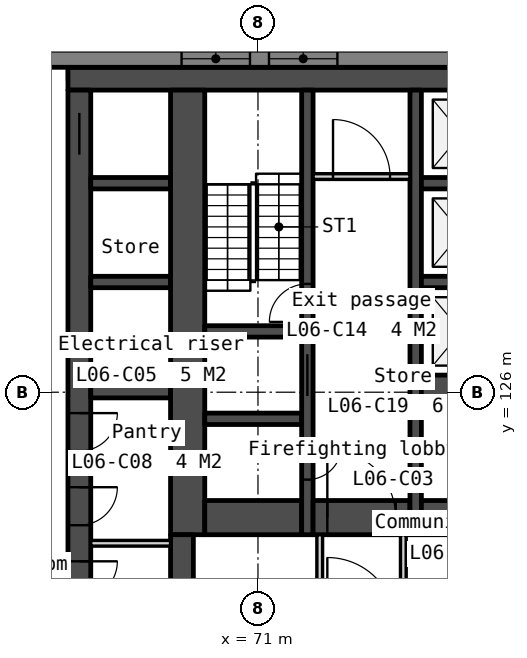
"""IFC4 building model, lengths in metres.
Left out: names, types, materials, properties, quantities, classifications, styles, units other than length and angle.
Written with IfcOpenShell. Run it as: python <this file> out.ifc"""

import sys

from ifc_helpers import new_model, si_unit, direction, frame, frame_2d, origin, place, context, subcontext, project, spatial, polyline, rectangle, outline, extrude, element, fill, save


model = new_model("IFC4")
c1 = context("Model", 3, precision=1e-05, world=origin(), true_north=direction((0.0, 1.0)))
c2 = subcontext(c1, "Body", "Model", "MODEL_VIEW")
j1 = project(units=[si_unit("LENGTHUNIT", "METRE"), si_unit("PLANEANGLEUNIT", "RADIAN")], contexts=[c1])
p1 = place(None, origin())
s1 = spatial("IfcSite", under=j1, at=p1, CompositionType="ELEMENT")
p2 = place(p1, origin())
s2 = spatial("IfcBuilding", under=s1, at=p2, CompositionType="ELEMENT")
p3 = place(p2, frame((0.0, 0.0, 35.0)))
s3 = spatial("IfcBuildingStorey", under=s2, at=p3, CompositionType="ELEMENT", Elevation=35.0)
p4 = place(p3, frame((66.0, 134.25, 0.0), z_axis=(0.0, 0.0, 1.0), x_axis=(1.0, 0.0, 0.0)))
e1 = element("IfcWall", 1, at=p4, inside=s3, PredefinedType="SOLIDWALL", context=c2, shape_type="SweptSolid", body=[
    extrude(rectangle(XDim=28.0, YDim=0.6, at=frame_2d((14.0, 0.0))), origin(), (0.0, 0.0, 1.0), 3.35),
])
p5 = place(p3, frame((66.3, 133.95, 0.0), z_axis=(0.0, 0.0, 1.0), x_axis=(0.0, -1.0, 0.0)))
e2 = element("IfcWall", 2, at=p5, inside=s3, PredefinedType="SOLIDWALL", context=c2, shape_type="SweptSolid", body=[
    extrude(rectangle(XDim=13.8, YDim=0.6, at=frame_2d((6.9, 0.0))), origin(), (0.0, 0.0, 1.0), 3.35),
])
p6 = place(p5, frame((0.6, 0.0, 0.0)))
e3 = element("IfcOpeningElement", 3, at=p6, cuts=e2, PredefinedType="OPENING", context=c2, shape_type="SweptSolid", body=[
    extrude(rectangle(XDim=1.1, YDim=2.1, at=frame_2d((0.55, 1.05))), frame((0.0, 0.31, 0.0), z_axis=(0.0, -1.0, 0.0), x_axis=(1.0, 0.0, 0.0)), (0.0, 0.0, 1.0), 0.62),
])
p7 = place(p5, frame((12.4, 0.0, 0.0)))
e4 = element("IfcOpeningElement", 4, at=p7, cuts=e2, PredefinedType="OPENING", context=c2, shape_type="SweptSolid", body=[
    extrude(rectangle(XDim=1.0, YDim=2.1, at=frame_2d((0.5, 1.05))), frame((0.0, 0.31, 0.0), z_axis=(0.0, -1.0, 0.0), x_axis=(1.0, 0.0, 0.0)), (0.0, 0.0, 1.0), 0.62),
])
p8 = place(p5, frame((8.5, 0.0, 0.0)))
e5 = element("IfcOpeningElement", 5, at=p8, cuts=e2, PredefinedType="OPENING", context=c2, shape_type="SweptSolid", body=[
    extrude(rectangle(XDim=1.0, YDim=2.1, at=frame_2d((0.5, 1.05))), frame((0.0, 0.31, 0.0), z_axis=(0.0, -1.0, 0.0), x_axis=(1.0, 0.0, 0.0)), (0.0, 0.0, 1.0), 0.62),
])
p9 = place(p5, frame((10.45, 0.0, 0.0)))
e6 = element("IfcOpeningElement", 6, at=p9, cuts=e2, PredefinedType="OPENING", context=c2, shape_type="SweptSolid", body=[
    extrude(rectangle(XDim=1.0, YDim=2.1, at=frame_2d((0.5, 1.05))), frame((0.0, 0.31, 0.0), z_axis=(0.0, -1.0, 0.0), x_axis=(1.0, 0.0, 0.0)), (0.0, 0.0, 1.0), 0.62),
])
for number, where, z_axis, x_axis in (
    (7, (66.6, 131.5, 0.0), (0.0, 0.0, 1.0), (1.0, 0.0, 0.0)),
    (8, (66.6, 128.9, 0.0), (0.0, 0.0, 1.0), (1.0, 0.0, 0.0)),
):
    element("IfcWall", number, at=place(p3, frame(where, z_axis=z_axis, x_axis=x_axis)), inside=s3, PredefinedType="SOLIDWALL", context=c2, shape_type="SweptSolid", body=[
        extrude(rectangle(XDim=2.1, YDim=0.3, at=frame_2d((1.05, 0.0))), origin(), (0.0, 0.0, 1.0), 3.35),
    ])
p10 = place(p3, frame((66.6, 126.15, 0.0), z_axis=(0.0, 0.0, 1.0), x_axis=(1.0, 0.0, 0.0)))
e9 = element("IfcWall", 9, at=p10, inside=s3, PredefinedType="SOLIDWALL", context=c2, shape_type="SweptSolid", body=[
    extrude(rectangle(XDim=2.1, YDim=0.6, at=frame_2d((1.05, 0.0))), origin(), (0.0, 0.0, 1.0), 3.35),
])
for number, where, z_axis, x_axis in (
    (10, (66.6, 123.975, 0.0), (0.0, 0.0, 1.0), (1.0, 0.0, 0.0)),
    (11, (66.6, 122.025, 0.0), (0.0, 0.0, 1.0), (1.0, 0.0, 0.0)),
):
    element("IfcWall", number, at=place(p3, frame(where, z_axis=z_axis, x_axis=x_axis)), inside=s3, PredefinedType="PARTITIONING", context=c2, shape_type="SweptSolid", body=[
        extrude(rectangle(XDim=2.1, YDim=0.15, at=frame_2d((1.05, 0.0))), origin(), (0.0, 0.0, 1.0), 3.35),
    ])
p11 = place(p3, frame((69.15, 133.95, 0.0), z_axis=(0.0, 0.0, 1.0), x_axis=(0.0, -1.0, 0.0)))
e12 = element("IfcWall", 12, at=p11, inside=s3, PredefinedType="SOLIDWALL", context=c2, shape_type="SweptSolid", body=[
    extrude(rectangle(XDim=11.7, YDim=0.9, at=frame_2d((5.85, 0.0))), origin(), (0.0, 0.0, 1.0), 3.35),
])
p12 = place(p3, frame((69.0, 122.25, 0.0), z_axis=(0.0, 0.0, 1.0), x_axis=(0.0, -1.0, 0.0)))
e13 = element("IfcWall", 13, at=p12, inside=s3, PredefinedType="SOLIDWALL", context=c2, shape_type="SweptSolid", body=[
    extrude(rectangle(XDim=2.1, YDim=0.6, at=frame_2d((1.05, 0.0))), origin(), (0.0, 0.0, 1.0), 3.35),
])
for number, where, z_axis, x_axis in (
    (14, (69.6, 127.6, 0.0), (0.0, 0.0, 1.0), (1.0, 0.0, 0.0)),
    (15, (69.6, 125.3, 0.0), (0.0, 0.0, 1.0), (1.0, 0.0, 0.0)),
):
    element("IfcWall", number, at=place(p3, frame(where, z_axis=z_axis, x_axis=x_axis)), inside=s3, PredefinedType="SOLIDWALL", context=c2, shape_type="SweptSolid", body=[
        extrude(rectangle(XDim=2.55, YDim=0.3, at=frame_2d((1.275, 0.0))), origin(), (0.0, 0.0, 1.0), 3.35),
    ])
p13 = place(p3, frame((69.6, 122.7, 0.0), z_axis=(0.0, 0.0, 1.0), x_axis=(1.0, 0.0, 0.0)))
e16 = element("IfcWall", 16, at=p13, inside=s3, PredefinedType="SOLIDWALL", context=c2, shape_type="SweptSolid", body=[
    extrude(rectangle(XDim=2.55, YDim=0.9, at=frame_2d((1.275, 0.0))), origin(), (0.0, 0.0, 1.0), 3.35),
])
p14 = place(p3, frame((72.3, 133.95, 0.0), z_axis=(0.0, 0.0, 1.0), x_axis=(0.0, -1.0, 0.0)))
e17 = element("IfcWall", 17, at=p14, inside=s3, PredefinedType="SOLIDWALL", context=c2, shape_type="SweptSolid", body=[
    extrude(rectangle(XDim=11.7, YDim=0.3, at=frame_2d((5.85, 0.0))), origin(), (0.0, 0.0, 1.0), 3.35),
])
p15 = place(p14, frame((6.95, 0.0, 0.0)))
e18 = element("IfcOpeningElement", 18, at=p15, cuts=e17, PredefinedType="OPENING", context=c2, shape_type="SweptSolid", body=[
    extrude(rectangle(XDim=1.1, YDim=2.1, at=frame_2d((0.55, 1.05))), frame((0.0, 0.16, 0.0), z_axis=(0.0, -1.0, 0.0), x_axis=(1.0, 0.0, 0.0)), (0.0, 0.0, 1.0), 0.32),
])
p16 = place(p14, frame((9.35, 0.0, 0.0)))
e19 = element("IfcOpeningElement", 19, at=p16, cuts=e17, PredefinedType="OPENING", context=c2, shape_type="SweptSolid", body=[
    extrude(rectangle(XDim=0.9, YDim=2.1, at=frame_2d((0.45, 1.05))), frame((0.0, 0.16, 0.0), z_axis=(0.0, -1.0, 0.0), x_axis=(1.0, 0.0, 0.0)), (0.0, 0.0, 1.0), 0.32),
])
p17 = place(p14, frame((5.1, 0.0, 0.0)))
e20 = element("IfcOpeningElement", 20, at=p17, cuts=e17, PredefinedType="OPENING", context=c2, shape_type="SweptSolid", body=[
    extrude(rectangle(XDim=1.0, YDim=2.1, at=frame_2d((0.5, 1.05))), frame((0.0, 0.16, 0.0), z_axis=(0.0, -1.0, 0.0), x_axis=(1.0, 0.0, 0.0)), (0.0, 0.0, 1.0), 0.32),
])
p18 = place(p3, frame((72.45, 131.675, 0.0), z_axis=(0.0, 0.0, 1.0), x_axis=(1.0, 0.0, 0.0)))
e21 = element("IfcWall", 21, at=p18, inside=s3, PredefinedType="PARTITIONING", context=c2, shape_type="SweptSolid", body=[
    extrude(rectangle(XDim=2.55, YDim=0.15, at=frame_2d((1.275, 0.0))), origin(), (0.0, 0.0, 1.0), 3.35),
])
p19 = place(p18, frame((0.525, 0.0, 0.0)))
e22 = element("IfcOpeningElement", 22, at=p19, cuts=e21, PredefinedType="OPENING", context=c2, shape_type="SweptSolid", body=[
    extrude(rectangle(XDim=1.5, YDim=2.1, at=frame_2d((0.75, 1.05))), frame((0.0, 0.085, 0.0), z_axis=(0.0, -1.0, 0.0), x_axis=(1.0, 0.0, 0.0)), (0.0, 0.0, 1.0), 0.17),
])
p20 = place(p3, frame((72.45, 122.7, 0.0), z_axis=(0.0, 0.0, 1.0), x_axis=(1.0, 0.0, 0.0)))
e23 = element("IfcWall", 23, at=p20, inside=s3, PredefinedType="SOLIDWALL", context=c2, shape_type="SweptSolid", body=[
    extrude(rectangle(XDim=2.55, YDim=0.9, at=frame_2d((1.275, 0.0))), origin(), (0.0, 0.0, 1.0), 3.35),
])
p21 = place(p20, frame((0.375, 0.0, 0.0)))
e24 = element("IfcOpeningElement", 24, at=p21, cuts=e23, PredefinedType="OPENING", context=c2, shape_type="SweptSolid", body=[
    extrude(rectangle(XDim=1.8, YDim=2.1, at=frame_2d((0.9, 1.05))), frame((0.0, 0.46, 0.0), z_axis=(0.0, -1.0, 0.0), x_axis=(1.0, 0.0, 0.0)), (0.0, 0.0, 1.0), 0.92),
])
for number, where, z_axis, x_axis in (
    (25, (72.625, 122.25, 0.0), (0.0, 0.0, 1.0), (0.0, -1.0, 0.0)),
    (26, (74.825, 122.25, 0.0), (0.0, 0.0, 1.0), (0.0, -1.0, 0.0)),
):
    element("IfcWall", number, at=place(p3, frame(where, z_axis=z_axis, x_axis=x_axis)), inside=s3, PredefinedType="PARTITIONING", context=c2, shape_type="SweptSolid", body=[
        extrude(rectangle(XDim=2.1, YDim=0.15, at=frame_2d((1.05, 0.0))), origin(), (0.0, 0.0, 1.0), 3.35),
    ])
p22 = place(p3, frame((75.15, 133.95, 0.0), z_axis=(0.0, 0.0, 1.0), x_axis=(0.0, -1.0, 0.0)))
e27 = element("IfcWall", 27, at=p22, inside=s3, PredefinedType="SOLIDWALL", context=c2, shape_type="SweptSolid", body=[
    extrude(rectangle(XDim=11.7, YDim=0.3, at=frame_2d((5.85, 0.0))), origin(), (0.0, 0.0, 1.0), 3.35),
])
for number, where, z_axis, x_axis in (
    (28, (75.3, 131.5, 0.0), (0.0, 0.0, 1.0), (1.0, 0.0, 0.0)),
    (29, (75.3, 128.9, 0.0), (0.0, 0.0, 1.0), (1.0, 0.0, 0.0)),
):
    element("IfcWall", number, at=place(p3, frame(where, z_axis=z_axis, x_axis=x_axis)), inside=s3, PredefinedType="SOLIDWALL", context=c2, shape_type="SweptSolid", body=[
        extrude(rectangle(XDim=2.1, YDim=0.3, at=frame_2d((1.05, 0.0))), origin(), (0.0, 0.0, 1.0), 3.35),
    ])
p23 = place(p3, frame((75.3, 126.075, 0.0), z_axis=(0.0, 0.0, 1.0), x_axis=(1.0, 0.0, 0.0)))
e30 = element("IfcWall", 30, at=p23, inside=s3, PredefinedType="SOLIDWALL", context=c2, shape_type="SweptSolid", body=[
    extrude(rectangle(XDim=2.1, YDim=0.75, at=frame_2d((1.05, 0.0))), origin(), (0.0, 0.0, 1.0), 3.35),
])
p24 = place(p3, frame((75.3, 122.7, 0.0), z_axis=(0.0, 0.0, 1.0), x_axis=(1.0, 0.0, 0.0)))
e31 = element("IfcWall", 31, at=p24, inside=s3, PredefinedType="SOLIDWALL", context=c2, shape_type="SweptSolid", body=[
    extrude(rectangle(XDim=6.2, YDim=0.9, at=frame_2d((3.1, 0.0))), origin(), (0.0, 0.0, 1.0), 3.35),
])
p25 = place(p3, frame((102.4, 134.775, -0.2), z_axis=(0.0, 0.0, 1.0), x_axis=(-1.0, 0.0, 0.0)))
e32 = element("IfcWall", 32, at=p25, inside=s3, PredefinedType="SOLIDWALL", context=c2, shape_type="SweptSolid", body=[
    extrude(outline(polyline([(44.8, 0.0), (44.8, 3.55), (0.0, 3.55), (0.0, 0.0), (44.8, 0.0)])), frame((0.0, 0.225, 0.0), z_axis=(0.0, -1.0, 0.0), x_axis=(1.0, 0.0, 0.0)), (0.0, 0.0, 1.0), 0.45),
])
p26 = place(p25, frame((2.43, 0.0, 1.1)))
e33 = element("IfcOpeningElement", 33, at=p26, cuts=e32, PredefinedType="OPENING", context=c2, shape_type="SweptSolid", body=[
    extrude(rectangle(XDim=1.8, YDim=1.5, at=frame_2d((0.9, 0.75))), frame((0.0, 0.235, 0.0), z_axis=(0.0, -1.0, 0.0), x_axis=(1.0, 0.0, 0.0)), (0.0, 0.0, 1.0), 0.47),
])
p27 = place(p25, frame((4.73, 0.0, 1.1)))
e34 = element("IfcOpeningElement", 34, at=p27, cuts=e32, PredefinedType="OPENING", context=c2, shape_type="SweptSolid", body=[
    extrude(rectangle(XDim=1.8, YDim=1.5, at=frame_2d((0.9, 0.75))), frame((0.0, 0.235, 0.0), z_axis=(0.0, -1.0, 0.0), x_axis=(1.0, 0.0, 0.0)), (0.0, 0.0, 1.0), 0.47),
])
p28 = place(p25, frame((11.39, 0.0, 1.1)))
e35 = element("IfcOpeningElement", 35, at=p28, cuts=e32, PredefinedType="OPENING", context=c2, shape_type="SweptSolid", body=[
    extrude(rectangle(XDim=1.8, YDim=1.5, at=frame_2d((0.9, 0.75))), frame((0.0, 0.235, 0.0), z_axis=(0.0, -1.0, 0.0), x_axis=(1.0, 0.0, 0.0)), (0.0, 0.0, 1.0), 0.47),
])
p29 = place(p25, frame((13.69, 0.0, 1.1)))
e36 = element("IfcOpeningElement", 36, at=p29, cuts=e32, PredefinedType="OPENING", context=c2, shape_type="SweptSolid", body=[
    extrude(rectangle(XDim=1.8, YDim=1.5, at=frame_2d((0.9, 0.75))), frame((0.0, 0.235, 0.0), z_axis=(0.0, -1.0, 0.0), x_axis=(1.0, 0.0, 0.0)), (0.0, 0.0, 1.0), 0.47),
])
p30 = place(p25, frame((20.35, 0.0, 1.1)))
e37 = element("IfcOpeningElement", 37, at=p30, cuts=e32, PredefinedType="OPENING", context=c2, shape_type="SweptSolid", body=[
    extrude(rectangle(XDim=1.8, YDim=1.5, at=frame_2d((0.9, 0.75))), frame((0.0, 0.235, 0.0), z_axis=(0.0, -1.0, 0.0), x_axis=(1.0, 0.0, 0.0)), (0.0, 0.0, 1.0), 0.47),
])
p31 = place(p25, frame((22.65, 0.0, 1.1)))
e38 = element("IfcOpeningElement", 38, at=p31, cuts=e32, PredefinedType="OPENING", context=c2, shape_type="SweptSolid", body=[
    extrude(rectangle(XDim=1.8, YDim=1.5, at=frame_2d((0.9, 0.75))), frame((0.0, 0.235, 0.0), z_axis=(0.0, -1.0, 0.0), x_axis=(1.0, 0.0, 0.0)), (0.0, 0.0, 1.0), 0.47),
])
p32 = place(p25, frame((29.31, 0.0, 1.1)))
e39 = element("IfcOpeningElement", 39, at=p32, cuts=e32, PredefinedType="OPENING", context=c2, shape_type="SweptSolid", body=[
    extrude(rectangle(XDim=1.8, YDim=1.5, at=frame_2d((0.9, 0.75))), frame((0.0, 0.235, 0.0), z_axis=(0.0, -1.0, 0.0), x_axis=(1.0, 0.0, 0.0)), (0.0, 0.0, 1.0), 0.47),
])
p33 = place(p25, frame((31.61, 0.0, 1.1)))
e40 = element("IfcOpeningElement", 40, at=p33, cuts=e32, PredefinedType="OPENING", context=c2, shape_type="SweptSolid", body=[
    extrude(rectangle(XDim=1.8, YDim=1.5, at=frame_2d((0.9, 0.75))), frame((0.0, 0.235, 0.0), z_axis=(0.0, -1.0, 0.0), x_axis=(1.0, 0.0, 0.0)), (0.0, 0.0, 1.0), 0.47),
])
p34 = place(p25, frame((38.27, 0.0, 1.1)))
e41 = element("IfcOpeningElement", 41, at=p34, cuts=e32, PredefinedType="OPENING", context=c2, shape_type="SweptSolid", body=[
    extrude(rectangle(XDim=1.8, YDim=1.5, at=frame_2d((0.9, 0.75))), frame((0.0, 0.235, 0.0), z_axis=(0.0, -1.0, 0.0), x_axis=(1.0, 0.0, 0.0)), (0.0, 0.0, 1.0), 0.47),
])
p35 = place(p25, frame((40.57, 0.0, 1.1)))
e42 = element("IfcOpeningElement", 42, at=p35, cuts=e32, PredefinedType="OPENING", context=c2, shape_type="SweptSolid", body=[
    extrude(rectangle(XDim=1.8, YDim=1.5, at=frame_2d((0.9, 0.75))), frame((0.0, 0.235, 0.0), z_axis=(0.0, -1.0, 0.0), x_axis=(1.0, 0.0, 0.0)), (0.0, 0.0, 1.0), 0.47),
])
p36 = place(p3, frame((54.495, 129.397, -0.2), z_axis=(0.0, 0.0, 1.0), x_axis=(0.499999201451, -0.866025864826, 0.0)))
e43 = element("IfcWall", 43, at=p36, inside=s3, PredefinedType="SOLIDWALL", context=c2, shape_type="SweptSolid", body=[
    extrude(outline(polyline([(44.8, 0.0), (44.8, 3.55), (0.0, 3.55), (0.0, 0.0), (44.8, 0.0)])), frame((0.0, 0.225, 0.0), z_axis=(0.0, -1.0, 0.0), x_axis=(1.0, 0.0, 0.0)), (0.0, 0.0, 1.0), 0.45),
])
p37 = place(p36, frame((2.43, 0.0, 1.1)))
e44 = element("IfcOpeningElement", 44, at=p37, cuts=e43, PredefinedType="OPENING", context=c2, shape_type="SweptSolid", body=[
    extrude(rectangle(XDim=1.8, YDim=1.5, at=frame_2d((0.9, 0.75))), frame((0.0, 0.235, 0.0), z_axis=(0.0, -1.0, 0.0), x_axis=(1.0, 0.0, 0.0)), (0.0, 0.0, 1.0), 0.47),
])
p38 = place(p36, frame((4.73, 0.0, 0.2)))
e45 = element("IfcOpeningElement", 45, at=p38, cuts=e43, PredefinedType="OPENING", context=c2, shape_type="SweptSolid", body=[
    extrude(rectangle(XDim=1.8, YDim=2.4, at=frame_2d((0.9, 1.2))), frame((0.0, 0.235, 0.0), z_axis=(0.0, -1.0, 0.0), x_axis=(1.0, 0.0, 0.0)), (0.0, 0.0, 1.0), 0.47),
])
p39 = place(p36, frame((11.39, 0.0, 1.1)))
e46 = element("IfcOpeningElement", 46, at=p39, cuts=e43, PredefinedType="OPENING", context=c2, shape_type="SweptSolid", body=[
    extrude(rectangle(XDim=1.8, YDim=1.5, at=frame_2d((0.9, 0.75))), frame((0.0, 0.235, 0.0), z_axis=(0.0, -1.0, 0.0), x_axis=(1.0, 0.0, 0.0)), (0.0, 0.0, 1.0), 0.47),
])
p40 = place(p36, frame((13.69, 0.0, 1.1)))
e47 = element("IfcOpeningElement", 47, at=p40, cuts=e43, PredefinedType="OPENING", context=c2, shape_type="SweptSolid", body=[
    extrude(rectangle(XDim=1.8, YDim=1.5, at=frame_2d((0.9, 0.75))), frame((0.0, 0.235, 0.0), z_axis=(0.0, -1.0, 0.0), x_axis=(1.0, 0.0, 0.0)), (0.0, 0.0, 1.0), 0.47),
])
p41 = place(p36, frame((20.35, 0.0, 0.2)))
e48 = element("IfcOpeningElement", 48, at=p41, cuts=e43, PredefinedType="OPENING", context=c2, shape_type="SweptSolid", body=[
    extrude(rectangle(XDim=1.8, YDim=2.4, at=frame_2d((0.9, 1.2))), frame((0.0, 0.235, 0.0), z_axis=(0.0, -1.0, 0.0), x_axis=(1.0, 0.0, 0.0)), (0.0, 0.0, 1.0), 0.47),
])
p42 = place(p36, frame((22.65, 0.0, 1.1)))
e49 = element("IfcOpeningElement", 49, at=p42, cuts=e43, PredefinedType="OPENING", context=c2, shape_type="SweptSolid", body=[
    extrude(rectangle(XDim=1.8, YDim=1.5, at=frame_2d((0.9, 0.75))), frame((0.0, 0.235, 0.0), z_axis=(0.0, -1.0, 0.0), x_axis=(1.0, 0.0, 0.0)), (0.0, 0.0, 1.0), 0.47),
])
p43 = place(p36, frame((29.31, 0.0, 1.1)))
e50 = element("IfcOpeningElement", 50, at=p43, cuts=e43, PredefinedType="OPENING", context=c2, shape_type="SweptSolid", body=[
    extrude(rectangle(XDim=1.8, YDim=1.5, at=frame_2d((0.9, 0.75))), frame((0.0, 0.235, 0.0), z_axis=(0.0, -1.0, 0.0), x_axis=(1.0, 0.0, 0.0)), (0.0, 0.0, 1.0), 0.47),
])
p44 = place(p36, frame((31.61, 0.0, 0.2)))
e51 = element("IfcOpeningElement", 51, at=p44, cuts=e43, PredefinedType="OPENING", context=c2, shape_type="SweptSolid", body=[
    extrude(rectangle(XDim=1.8, YDim=2.4, at=frame_2d((0.9, 1.2))), frame((0.0, 0.235, 0.0), z_axis=(0.0, -1.0, 0.0), x_axis=(1.0, 0.0, 0.0)), (0.0, 0.0, 1.0), 0.47),
])
p45 = place(p36, frame((38.27, 0.0, 1.1)))
e52 = element("IfcOpeningElement", 52, at=p45, cuts=e43, PredefinedType="OPENING", context=c2, shape_type="SweptSolid", body=[
    extrude(rectangle(XDim=1.8, YDim=1.5, at=frame_2d((0.9, 0.75))), frame((0.0, 0.235, 0.0), z_axis=(0.0, -1.0, 0.0), x_axis=(1.0, 0.0, 0.0)), (0.0, 0.0, 1.0), 0.47),
])
p46 = place(p36, frame((40.57, 0.0, 1.1)))
e53 = element("IfcOpeningElement", 53, at=p46, cuts=e43, PredefinedType="OPENING", context=c2, shape_type="SweptSolid", body=[
    extrude(rectangle(XDim=1.8, YDim=1.5, at=frame_2d((0.9, 0.75))), frame((0.0, 0.235, 0.0), z_axis=(0.0, -1.0, 0.0), x_axis=(1.0, 0.0, 0.0)), (0.0, 0.0, 1.0), 0.47),
])
p47 = place(p3, frame((77.166, 81.679, 0.0), z_axis=(0.0, 0.0, 1.0), x_axis=(-0.500001932243, 0.8660242882, 0.0)))
e54 = element("IfcWall", 54, at=p47, inside=s3, PredefinedType="STANDARD", context=c2, shape_type="SweptSolid", body=[
    extrude(rectangle(XDim=54.747, YDim=1.0, at=frame_2d((27.374, 0.0))), origin(), (0.0, 0.0, 1.0), 0.6),
])
p48 = place(p6, origin())
e55 = element("IfcDoor", 55, at=p48, inside=s3, OperationType="SLIDING_TO_LEFT", PredefinedType="DOOR", context=c2, shape_type="SweptSolid", body=[
    extrude(rectangle(XDim=1.1, YDim=2.1, at=frame_2d((0.55, 1.05))), frame((0.0, 0.025, 0.0), z_axis=(0.0, -1.0, 0.0), x_axis=(1.0, 0.0, 0.0)), (0.0, 0.0, 1.0), 0.05),
])
fill(e3, e55)
p49 = place(p15, origin())
e56 = element("IfcDoor", 56, at=p49, inside=s3, OperationType="SLIDING_TO_LEFT", PredefinedType="DOOR", context=c2, shape_type="SweptSolid", body=[
    extrude(rectangle(XDim=1.1, YDim=2.1, at=frame_2d((0.55, 1.05))), frame((0.0, 0.025, 0.0), z_axis=(0.0, -1.0, 0.0), x_axis=(1.0, 0.0, 0.0)), (0.0, 0.0, 1.0), 0.05),
])
fill(e18, e56)
p50 = place(p21, origin())
e57 = element("IfcDoor", 57, at=p50, inside=s3, OperationType="DOUBLE_DOOR_DOUBLE_SWING", PredefinedType="DOOR", context=c2, shape_type="SweptSolid", body=[
    extrude(rectangle(XDim=1.8, YDim=2.1, at=frame_2d((0.9, 1.05))), frame((0.0, 0.025, 0.0), z_axis=(0.0, -1.0, 0.0), x_axis=(1.0, 0.0, 0.0)), (0.0, 0.0, 1.0), 0.05),
])
fill(e24, e57)
p51 = place(p19, origin())
e58 = element("IfcDoor", 58, at=p51, inside=s3, OperationType="DOUBLE_DOOR_DOUBLE_SWING", PredefinedType="DOOR", context=c2, shape_type="SweptSolid", body=[
    extrude(rectangle(XDim=1.5, YDim=2.1, at=frame_2d((0.75, 1.05))), frame((0.0, 0.025, 0.0), z_axis=(0.0, -1.0, 0.0), x_axis=(1.0, 0.0, 0.0)), (0.0, 0.0, 1.0), 0.05),
])
fill(e22, e58)
p52 = place(p16, origin())
e59 = element("IfcDoor", 59, at=p52, inside=s3, OperationType="SINGLE_SWING_LEFT", PredefinedType="DOOR", context=c2, shape_type="SweptSolid", body=[
    extrude(rectangle(XDim=0.9, YDim=2.1, at=frame_2d((0.45, 1.05))), frame((0.0, 0.025, 0.0), z_axis=(0.0, -1.0, 0.0), x_axis=(1.0, 0.0, 0.0)), (0.0, 0.0, 1.0), 0.05),
])
fill(e19, e59)
p53 = place(p17, origin())
e60 = element("IfcDoor", 60, at=p53, inside=s3, OperationType="SINGLE_SWING_RIGHT", PredefinedType="DOOR", context=c2, shape_type="SweptSolid", body=[
    extrude(rectangle(XDim=1.0, YDim=2.1, at=frame_2d((0.5, 1.05))), frame((0.0, 0.025, 0.0), z_axis=(0.0, -1.0, 0.0), x_axis=(1.0, 0.0, 0.0)), (0.0, 0.0, 1.0), 0.05),
])
fill(e20, e60)
p54 = place(p7, origin())
e61 = element("IfcDoor", 61, at=p54, inside=s3, OperationType="SINGLE_SWING_LEFT", PredefinedType="DOOR", context=c2, shape_type="SweptSolid", body=[
    extrude(rectangle(XDim=1.0, YDim=2.1, at=frame_2d((0.5, 1.05))), frame((0.0, 0.025, 0.0), z_axis=(0.0, -1.0, 0.0), x_axis=(1.0, 0.0, 0.0)), (0.0, 0.0, 1.0), 0.05),
])
fill(e4, e61)
p55 = place(p8, origin())
e62 = element("IfcDoor", 62, at=p55, inside=s3, OperationType="SINGLE_SWING_LEFT", PredefinedType="DOOR", context=c2, shape_type="SweptSolid", body=[
    extrude(rectangle(XDim=1.0, YDim=2.1, at=frame_2d((0.5, 1.05))), frame((0.0, 0.025, 0.0), z_axis=(0.0, -1.0, 0.0), x_axis=(1.0, 0.0, 0.0)), (0.0, 0.0, 1.0), 0.05),
])
fill(e5, e62)
p56 = place(p9, origin())
e63 = element("IfcDoor", 63, at=p56, inside=s3, OperationType="SINGLE_SWING_LEFT", PredefinedType="DOOR", context=c2, shape_type="SweptSolid", body=[
    extrude(rectangle(XDim=1.0, YDim=2.1, at=frame_2d((0.5, 1.05))), frame((0.0, 0.025, 0.0), z_axis=(0.0, -1.0, 0.0), x_axis=(1.0, 0.0, 0.0)), (0.0, 0.0, 1.0), 0.05),
])
fill(e6, e63)
p57 = place(p32, origin())
e64 = element("IfcWindow", 64, at=p57, inside=s3, PartitioningType="SINGLE_PANEL", PredefinedType="WINDOW", context=c2, shape_type="SweptSolid", body=[
    extrude(rectangle(XDim=1.8, YDim=1.5, at=frame_2d((0.9, 0.75))), frame((0.0, 0.03, 0.0), z_axis=(0.0, -1.0, 0.0), x_axis=(1.0, 0.0, 0.0)), (0.0, 0.0, 1.0), 0.06),
])
fill(e39, e64)
p58 = place(p33, origin())
e65 = element("IfcWindow", 65, at=p58, inside=s3, PartitioningType="SINGLE_PANEL", PredefinedType="WINDOW", context=c2, shape_type="SweptSolid", body=[
    extrude(rectangle(XDim=1.8, YDim=1.5, at=frame_2d((0.9, 0.75))), frame((0.0, 0.03, 0.0), z_axis=(0.0, -1.0, 0.0), x_axis=(1.0, 0.0, 0.0)), (0.0, 0.0, 1.0), 0.06),
])
fill(e40, e65)
save(model, sys.argv[1])
